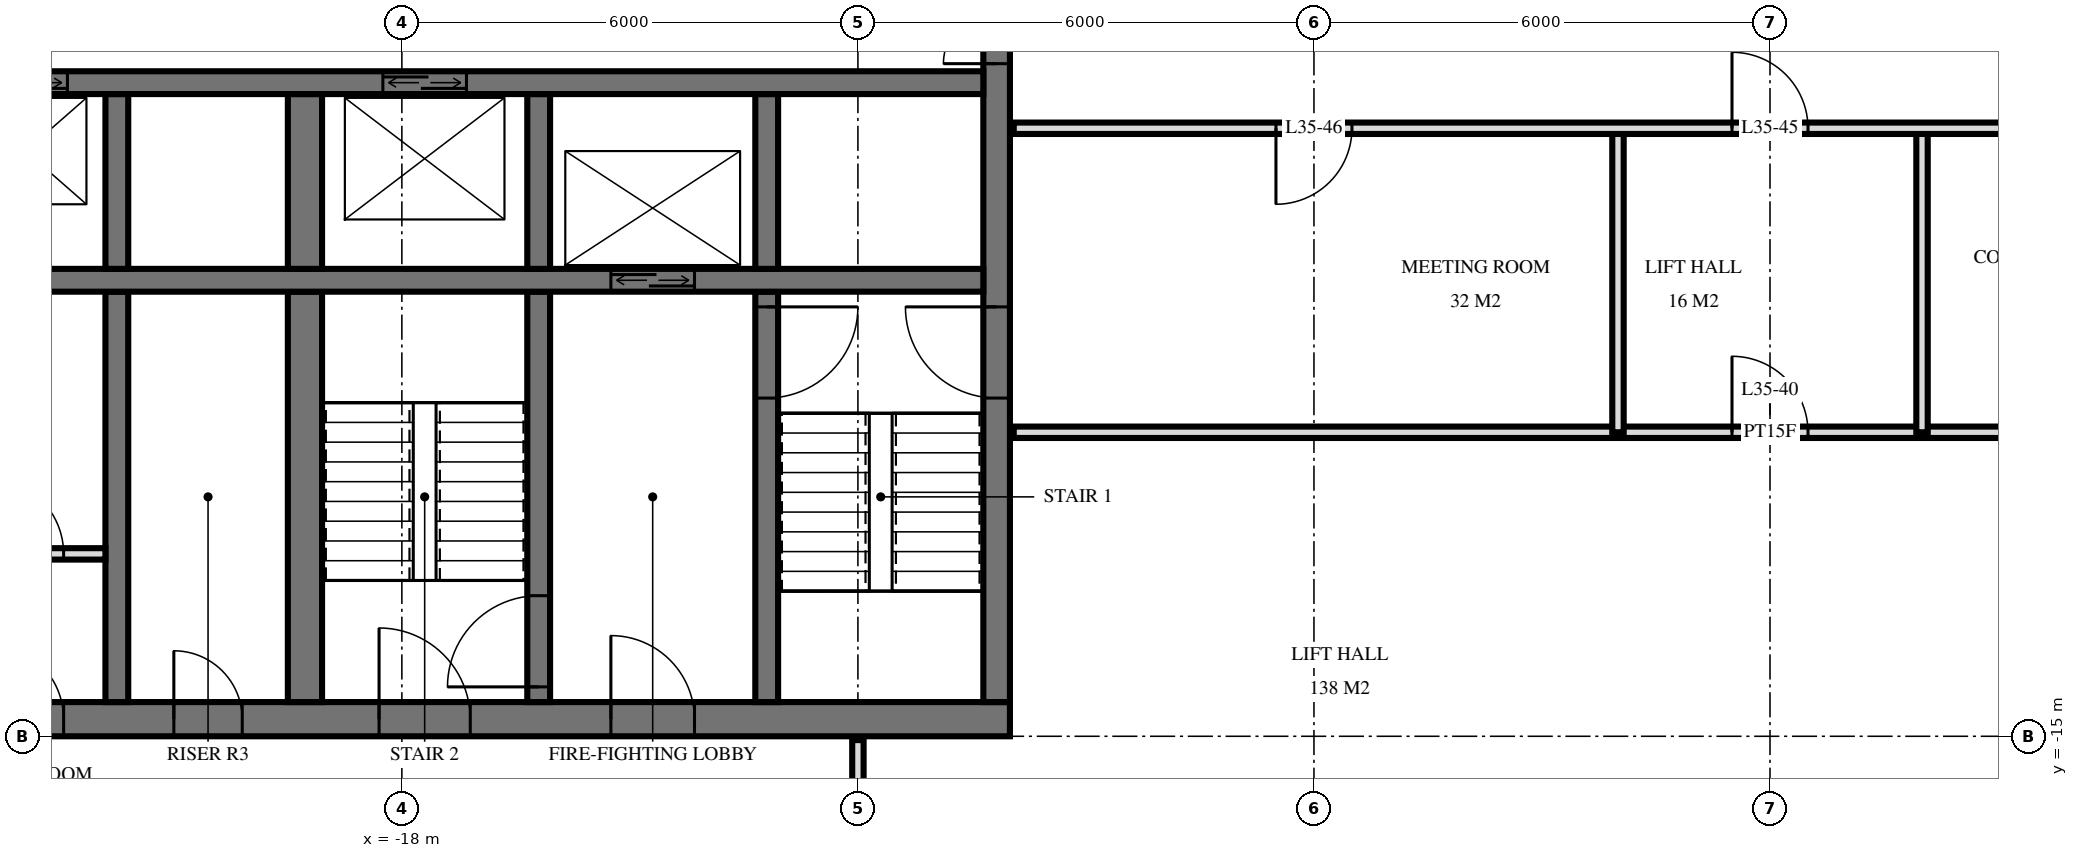
"""IFC4 building model, lengths in metres.
Left out: names, types, materials, properties, quantities, classifications, styles, units other than length and angle.
Written with IfcOpenShell. Run it as: python <this file> out.ifc"""

import sys

from ifc_helpers import new_model, si_unit, direction, frame, frame_2d, origin, place, context, subcontext, project, spatial, rectangle, extrude, element, fill, save


model = new_model("IFC4")
c1 = context("Model", 3, precision=1e-05, world=origin(), true_north=direction((0.0, 1.0)))
c2 = subcontext(c1, "Body", "Model", "MODEL_VIEW")
j1 = project(units=[si_unit("LENGTHUNIT", "METRE"), si_unit("PLANEANGLEUNIT", "RADIAN")], contexts=[c1])
p1 = place(None, origin())
s1 = spatial("IfcSite", under=j1, at=p1, CompositionType="ELEMENT")
p2 = place(p1, origin())
s2 = spatial("IfcBuilding", under=s1, at=p2, CompositionType="ELEMENT")
p3 = place(p2, frame((0.0, 0.0, 138.0)))
s3 = spatial("IfcBuildingStorey", under=s2, at=p3, CompositionType="ELEMENT", Elevation=138.0)
p4 = place(p3, frame((-24.5, -14.775, 0.0), z_axis=(0.0, 0.0, 1.0), x_axis=(1.0, 0.0, 0.0)))
e1 = element("IfcWall", 1, at=p4, inside=s3, PredefinedType="SHEAR", context=c2, shape_type="SweptSolid", body=[
    extrude(rectangle(XDim=14.5, YDim=0.45, at=frame_2d((7.25, 0.0))), origin(), (0.0, 0.0, 1.0), 3.6),
])
p5 = place(p4, frame((6.2, 0.0, 0.0)))
e2 = element("IfcOpeningElement", 2, at=p5, cuts=e1, PredefinedType="OPENING", context=c2, shape_type="SweptSolid", body=[
    extrude(rectangle(XDim=1.2, YDim=2.1, at=frame_2d((0.6, 1.05))), frame((0.0, 0.235, 0.0), z_axis=(0.0, -1.0, 0.0), x_axis=(1.0, 0.0, 0.0)), (0.0, 0.0, 1.0), 0.47),
])
p6 = place(p4, frame((9.25, 0.0, 0.0)))
e3 = element("IfcOpeningElement", 3, at=p6, cuts=e1, PredefinedType="OPENING", context=c2, shape_type="SweptSolid", body=[
    extrude(rectangle(XDim=1.1, YDim=2.1, at=frame_2d((0.55, 1.05))), frame((0.0, 0.235, 0.0), z_axis=(0.0, -1.0, 0.0), x_axis=(1.0, 0.0, 0.0)), (0.0, 0.0, 1.0), 0.47),
])
p7 = place(p4, frame((3.5, 0.0, 0.0)))
e4 = element("IfcOpeningElement", 4, at=p7, cuts=e1, PredefinedType="OPENING", context=c2, shape_type="SweptSolid", body=[
    extrude(rectangle(XDim=0.9, YDim=2.1, at=frame_2d((0.45, 1.05))), frame((0.0, 0.235, 0.0), z_axis=(0.0, -1.0, 0.0), x_axis=(1.0, 0.0, 0.0)), (0.0, 0.0, 1.0), 0.47),
])
p8 = place(p4, frame((1.05, 0.0, 0.0)))
e5 = element("IfcOpeningElement", 5, at=p8, cuts=e1, PredefinedType="OPENING", context=c2, shape_type="SweptSolid", body=[
    extrude(rectangle(XDim=1.0, YDim=2.1, at=frame_2d((0.5, 1.05))), frame((0.0, 0.235, 0.0), z_axis=(0.0, -1.0, 0.0), x_axis=(1.0, 0.0, 0.0)), (0.0, 0.0, 1.0), 0.47),
])
p9 = place(p3, frame((-10.175, -14.55, 0.0), z_axis=(0.0, 0.0, 1.0), x_axis=(0.0, 1.0, 0.0)))
e6 = element("IfcWall", 6, at=p9, inside=s3, PredefinedType="SHEAR", context=c2, shape_type="SweptSolid", body=[
    extrude(rectangle(XDim=14.1, YDim=0.35, at=frame_2d((7.05, 0.0))), origin(), (0.0, 0.0, 1.0), 3.6),
])
p10 = place(p9, frame((8.4, 0.0, 0.0)))
e7 = element("IfcOpeningElement", 7, at=p10, cuts=e6, PredefinedType="OPENING", context=c2, shape_type="SweptSolid", body=[
    extrude(rectangle(XDim=1.4, YDim=2.4, at=frame_2d((0.7, 1.2))), frame((0.0, 0.185, 0.0), z_axis=(0.0, -1.0, 0.0), x_axis=(1.0, 0.0, 0.0)), (0.0, 0.0, 1.0), 0.37),
])
p11 = place(p9, frame((10.0, 0.0, 0.0)))
e8 = element("IfcOpeningElement", 8, at=p11, cuts=e6, PredefinedType="OPENING", context=c2, shape_type="SweptSolid", body=[
    extrude(rectangle(XDim=1.4, YDim=2.4, at=frame_2d((0.7, 1.2))), frame((0.0, 0.185, 0.0), z_axis=(0.0, -1.0, 0.0), x_axis=(1.0, 0.0, 0.0)), (0.0, 0.0, 1.0), 0.37),
])
p12 = place(p9, frame((4.0, 0.0, 0.0)))
e9 = element("IfcOpeningElement", 9, at=p12, cuts=e6, PredefinedType="OPENING", context=c2, shape_type="SweptSolid", body=[
    extrude(rectangle(XDim=1.2, YDim=2.1, at=frame_2d((0.6, 1.05))), frame((0.0, 0.185, 0.0), z_axis=(0.0, -1.0, 0.0), x_axis=(1.0, 0.0, 0.0)), (0.0, 0.0, 1.0), 0.37),
])
p13 = place(p3, frame((-24.05, -6.4, 0.0), z_axis=(0.0, 0.0, 1.0), x_axis=(1.0, 0.0, 0.0)))
e10 = element("IfcWall", 10, at=p13, inside=s3, PredefinedType="SHEAR", context=c2, shape_type="SweptSolid", body=[
    extrude(rectangle(XDim=13.7, YDim=0.3, at=frame_2d((6.85, 0.0))), origin(), (0.0, 0.0, 1.0), 3.6),
])
p14 = place(p13, frame((0.55, 0.0, 0.0)))
e11 = element("IfcOpeningElement", 11, at=p14, cuts=e10, PredefinedType="OPENING", context=c2, shape_type="SweptSolid", body=[
    extrude(rectangle(XDim=1.1, YDim=2.1, at=frame_2d((0.55, 1.05))), frame((0.0, 0.16, 0.0), z_axis=(0.0, -1.0, 0.0), x_axis=(1.0, 0.0, 0.0)), (0.0, 0.0, 1.0), 0.32),
])
p15 = place(p13, frame((5.8, 0.0, 0.0)))
e12 = element("IfcOpeningElement", 12, at=p15, cuts=e10, PredefinedType="OPENING", context=c2, shape_type="SweptSolid", body=[
    extrude(rectangle(XDim=1.1, YDim=2.1, at=frame_2d((0.55, 1.05))), frame((0.0, 0.16, 0.0), z_axis=(0.0, -1.0, 0.0), x_axis=(1.0, 0.0, 0.0)), (0.0, 0.0, 1.0), 0.32),
])
p16 = place(p3, frame((-24.05, -9.0, 0.0), z_axis=(0.0, 0.0, 1.0), x_axis=(1.0, 0.0, 0.0)))
e13 = element("IfcWall", 13, at=p16, inside=s3, PredefinedType="SHEAR", context=c2, shape_type="SweptSolid", body=[
    extrude(rectangle(XDim=13.7, YDim=0.3, at=frame_2d((6.85, 0.0))), origin(), (0.0, 0.0, 1.0), 3.6),
])
p17 = place(p16, frame((8.8, 0.0, 0.0)))
e14 = element("IfcOpeningElement", 14, at=p17, cuts=e13, PredefinedType="OPENING", context=c2, shape_type="SweptSolid", body=[
    extrude(rectangle(XDim=1.1, YDim=2.1, at=frame_2d((0.55, 1.05))), frame((0.0, 0.16, 0.0), z_axis=(0.0, -1.0, 0.0), x_axis=(1.0, 0.0, 0.0)), (0.0, 0.0, 1.0), 0.32),
])
p18 = place(p3, frame((-13.2, -8.85, 0.0), z_axis=(0.0, 0.0, 1.0), x_axis=(0.0, 1.0, 0.0)))
e15 = element("IfcWall", 15, at=p18, inside=s3, PredefinedType="SHEAR", context=c2, shape_type="SweptSolid", body=[
    extrude(rectangle(XDim=2.3, YDim=0.3, at=frame_2d((1.15, 0.0))), origin(), (0.0, 0.0, 1.0), 3.6),
])
p19 = place(p3, frame((-13.2, -14.55, 0.0), z_axis=(0.0, 0.0, 1.0), x_axis=(0.0, 1.0, 0.0)))
e16 = element("IfcWall", 16, at=p19, inside=s3, PredefinedType="SHEAR", context=c2, shape_type="SweptSolid", body=[
    extrude(rectangle(XDim=5.4, YDim=0.3, at=frame_2d((2.7, 0.0))), origin(), (0.0, 0.0, 1.0), 3.6),
])
p20 = place(p19, frame((4.0, 0.0, 0.0)))
e17 = element("IfcOpeningElement", 17, at=p20, cuts=e16, PredefinedType="OPENING", context=c2, shape_type="SweptSolid", body=[
    extrude(rectangle(XDim=1.2, YDim=2.1, at=frame_2d((0.6, 1.05))), frame((0.0, 0.16, 0.0), z_axis=(0.0, -1.0, 0.0), x_axis=(1.0, 0.0, 0.0)), (0.0, 0.0, 1.0), 0.32),
])
p21 = place(p3, frame((-16.2, -8.85, 0.0), z_axis=(0.0, 0.0, 1.0), x_axis=(0.0, 1.0, 0.0)))
e18 = element("IfcWall", 18, at=p21, inside=s3, PredefinedType="SHEAR", context=c2, shape_type="SweptSolid", body=[
    extrude(rectangle(XDim=2.3, YDim=0.3, at=frame_2d((1.15, 0.0))), origin(), (0.0, 0.0, 1.0), 3.6),
])
p22 = place(p3, frame((-16.2, -14.55, 0.0), z_axis=(0.0, 0.0, 1.0), x_axis=(0.0, 1.0, 0.0)))
e19 = element("IfcWall", 19, at=p22, inside=s3, PredefinedType="SHEAR", context=c2, shape_type="SweptSolid", body=[
    extrude(rectangle(XDim=5.4, YDim=0.3, at=frame_2d((2.7, 0.0))), origin(), (0.0, 0.0, 1.0), 3.6),
])
p23 = place(p22, frame((0.2, 0.0, 0.0)))
e20 = element("IfcOpeningElement", 20, at=p23, cuts=e19, PredefinedType="OPENING", context=c2, shape_type="SweptSolid", body=[
    extrude(rectangle(XDim=1.2, YDim=2.1, at=frame_2d((0.6, 1.05))), frame((0.0, 0.16, 0.0), z_axis=(0.0, -1.0, 0.0), x_axis=(1.0, 0.0, 0.0)), (0.0, 0.0, 1.0), 0.32),
])
p24 = place(p3, frame((-19.275, -8.85, 0.0), z_axis=(0.0, 0.0, 1.0), x_axis=(0.0, 1.0, 0.0)))
e21 = element("IfcWall", 21, at=p24, inside=s3, PredefinedType="SHEAR", context=c2, shape_type="SweptSolid", body=[
    extrude(rectangle(XDim=2.3, YDim=0.45, at=frame_2d((1.15, 0.0))), origin(), (0.0, 0.0, 1.0), 3.6),
])
p25 = place(p3, frame((-19.275, -14.55, 0.0), z_axis=(0.0, 0.0, 1.0), x_axis=(0.0, 1.0, 0.0)))
e22 = element("IfcWall", 22, at=p25, inside=s3, PredefinedType="SHEAR", context=c2, shape_type="SweptSolid", body=[
    extrude(rectangle(XDim=5.4, YDim=0.45, at=frame_2d((2.7, 0.0))), origin(), (0.0, 0.0, 1.0), 3.6),
])
p26 = place(p3, frame((-21.75, -8.85, 0.0), z_axis=(0.0, 0.0, 1.0), x_axis=(0.0, 1.0, 0.0)))
e23 = element("IfcWall", 23, at=p26, inside=s3, PredefinedType="SHEAR", context=c2, shape_type="SweptSolid", body=[
    extrude(rectangle(XDim=2.3, YDim=0.3, at=frame_2d((1.15, 0.0))), origin(), (0.0, 0.0, 1.0), 3.6),
])
p27 = place(p3, frame((-21.75, -14.55, 0.0), z_axis=(0.0, 0.0, 1.0), x_axis=(0.0, 1.0, 0.0)))
e24 = element("IfcWall", 24, at=p27, inside=s3, PredefinedType="SHEAR", context=c2, shape_type="SweptSolid", body=[
    extrude(rectangle(XDim=5.4, YDim=0.3, at=frame_2d((2.7, 0.0))), origin(), (0.0, 0.0, 1.0), 3.6),
])
p28 = place(p3, frame((-24.0, -12.6, 0.0), z_axis=(0.0, 0.0, 1.0), x_axis=(1.0, 0.0, 0.0)))
e25 = element("IfcWall", 25, at=p28, inside=s3, PredefinedType="PARTITIONING", context=c2, shape_type="SweptSolid", body=[
    extrude(rectangle(XDim=2.1, YDim=0.15, at=frame_2d((1.05, 0.0))), origin(), (0.0, 0.0, 1.0), 3.3),
])
p29 = place(p28, frame((0.55, 0.0, 0.0)))
e26 = element("IfcOpeningElement", 26, at=p29, cuts=e25, PredefinedType="OPENING", context=c2, shape_type="SweptSolid", body=[
    extrude(rectangle(XDim=1.0, YDim=2.1, at=frame_2d((0.5, 1.05))), frame((0.0, 0.085, 0.0), z_axis=(0.0, -1.0, 0.0), x_axis=(1.0, 0.0, 0.0)), (0.0, 0.0, 1.0), 0.17),
])
for number, where, z_axis, x_axis in (
    (27, (2.0, -11.0, 0.0), (0.0, 0.0, 1.0), (0.0, 1.0, 0.0)),
    (28, (-2.0, -11.0, 0.0), (0.0, 0.0, 1.0), (0.0, 1.0, 0.0)),
):
    element("IfcWall", number, at=place(p3, frame(where, z_axis=z_axis, x_axis=x_axis)), inside=s3, PredefinedType="PARTITIONING", context=c2, shape_type="SweptSolid", body=[
        extrude(rectangle(XDim=4.0, YDim=0.15, at=frame_2d((2.0, 0.0))), origin(), (0.0, 0.0, 1.0), 3.32),
    ])
p30 = place(p3, frame((-12.0, -17.4, 0.0), z_axis=(0.0, 0.0, 1.0), x_axis=(0.0, 1.0, 0.0)))
e29 = element("IfcWall", 29, at=p30, inside=s3, PredefinedType="PARTITIONING", context=c2, shape_type="SweptSolid", body=[
    extrude(rectangle(XDim=2.35, YDim=0.15, at=frame_2d((1.175, 0.0))), origin(), (0.0, 0.0, 1.0), 3.32),
])
p31 = place(p30, frame((0.7, 0.0, 0.0)))
e30 = element("IfcOpeningElement", 30, at=p31, cuts=e29, PredefinedType="OPENING", context=c2, shape_type="SweptSolid", body=[
    extrude(rectangle(XDim=1.0, YDim=2.1, at=frame_2d((0.5, 1.05))), frame((0.0, 0.085, 0.0), z_axis=(0.0, -1.0, 0.0), x_axis=(1.0, 0.0, 0.0)), (0.0, 0.0, 1.0), 0.17),
])
p32 = place(p3, frame((-9.95, -11.0, 0.0), z_axis=(0.0, 0.0, 1.0), x_axis=(1.0, 0.0, 0.0)))
e31 = element("IfcWall", 31, at=p32, inside=s3, PredefinedType="PARTITIONING", context=c2, shape_type="SweptSolid", body=[
    extrude(rectangle(XDim=19.9, YDim=0.15, at=frame_2d((9.95, 0.0))), origin(), (0.0, 0.0, 1.0), 3.32),
])
p33 = place(p32, frame((9.45, 0.0, 0.0)))
e32 = element("IfcOpeningElement", 32, at=p33, cuts=e31, PredefinedType="OPENING", context=c2, shape_type="SweptSolid", body=[
    extrude(rectangle(XDim=1.0, YDim=2.1, at=frame_2d((0.5, 1.05))), frame((0.0, 0.085, 0.0), z_axis=(0.0, -1.0, 0.0), x_axis=(1.0, 0.0, 0.0)), (0.0, 0.0, 1.0), 0.17),
])
p34 = place(p32, frame((15.45, 0.0, 0.0)))
e33 = element("IfcOpeningElement", 33, at=p34, cuts=e31, PredefinedType="OPENING", context=c2, shape_type="SweptSolid", body=[
    extrude(rectangle(XDim=1.0, YDim=2.1, at=frame_2d((0.5, 1.05))), frame((0.0, 0.085, 0.0), z_axis=(0.0, -1.0, 0.0), x_axis=(1.0, 0.0, 0.0)), (0.0, 0.0, 1.0), 0.17),
])
p35 = place(p3, frame((-9.95, -7.0, 0.0), z_axis=(0.0, 0.0, 1.0), x_axis=(1.0, 0.0, 0.0)))
e34 = element("IfcWall", 34, at=p35, inside=s3, PredefinedType="PARTITIONING", context=c2, shape_type="SweptSolid", body=[
    extrude(rectangle(XDim=19.9, YDim=0.15, at=frame_2d((9.95, 0.0))), origin(), (0.0, 0.0, 1.0), 3.32),
])
p36 = place(p35, frame((9.45, 0.0, 0.0)))
e35 = element("IfcOpeningElement", 35, at=p36, cuts=e34, PredefinedType="OPENING", context=c2, shape_type="SweptSolid", body=[
    extrude(rectangle(XDim=1.0, YDim=2.1, at=frame_2d((0.5, 1.05))), frame((0.0, 0.085, 0.0), z_axis=(0.0, -1.0, 0.0), x_axis=(1.0, 0.0, 0.0)), (0.0, 0.0, 1.0), 0.17),
])
p37 = place(p35, frame((3.45, 0.0, 0.0)))
e36 = element("IfcOpeningElement", 36, at=p37, cuts=e34, PredefinedType="OPENING", context=c2, shape_type="SweptSolid", body=[
    extrude(rectangle(XDim=1.0, YDim=2.1, at=frame_2d((0.5, 1.05))), frame((0.0, 0.085, 0.0), z_axis=(0.0, -1.0, 0.0), x_axis=(1.0, 0.0, 0.0)), (0.0, 0.0, 1.0), 0.17),
])
p38 = place(p14, origin())
e37 = element("IfcDoor", 37, at=p38, inside=s3, OperationType="DOUBLE_DOOR_SLIDING", PredefinedType="USERDEFINED", context=c2, shape_type="SweptSolid", body=[
    extrude(rectangle(XDim=1.1, YDim=2.1, at=frame_2d((0.55, 1.05))), frame((0.0, 0.025, 0.0), z_axis=(0.0, -1.0, 0.0), x_axis=(1.0, 0.0, 0.0)), (0.0, 0.0, 1.0), 0.05),
])
fill(e11, e37)
p39 = place(p17, origin())
e38 = element("IfcDoor", 38, at=p39, inside=s3, OperationType="DOUBLE_DOOR_SLIDING", PredefinedType="USERDEFINED", context=c2, shape_type="SweptSolid", body=[
    extrude(rectangle(XDim=1.1, YDim=2.1, at=frame_2d((0.55, 1.05))), frame((0.0, 0.025, 0.0), z_axis=(0.0, -1.0, 0.0), x_axis=(1.0, 0.0, 0.0)), (0.0, 0.0, 1.0), 0.05),
])
fill(e14, e38)
p40 = place(p15, origin())
e39 = element("IfcDoor", 39, at=p40, inside=s3, OperationType="DOUBLE_DOOR_SLIDING", PredefinedType="USERDEFINED", context=c2, shape_type="SweptSolid", body=[
    extrude(rectangle(XDim=1.1, YDim=2.1, at=frame_2d((0.55, 1.05))), frame((0.0, 0.025, 0.0), z_axis=(0.0, -1.0, 0.0), x_axis=(1.0, 0.0, 0.0)), (0.0, 0.0, 1.0), 0.05),
])
fill(e12, e39)
p41 = place(p10, origin())
e40 = element("IfcDoor", 40, at=p41, inside=s3, OperationType="DOUBLE_DOOR_SINGLE_SWING", PredefinedType="DOOR", context=c2, shape_type="SweptSolid", body=[
    extrude(rectangle(XDim=1.4, YDim=2.4, at=frame_2d((0.7, 1.2))), frame((0.0, 0.025, 0.0), z_axis=(0.0, -1.0, 0.0), x_axis=(1.0, 0.0, 0.0)), (0.0, 0.0, 1.0), 0.05),
])
fill(e7, e40)
p42 = place(p12, origin())
e41 = element("IfcDoor", 41, at=p42, inside=s3, OperationType="SINGLE_SWING_LEFT", PredefinedType="DOOR", context=c2, shape_type="SweptSolid", body=[
    extrude(rectangle(XDim=1.2, YDim=2.1, at=frame_2d((0.6, 1.05))), frame((0.0, 0.025, 0.0), z_axis=(0.0, -1.0, 0.0), x_axis=(1.0, 0.0, 0.0)), (0.0, 0.0, 1.0), 0.05),
])
fill(e9, e41)
p43 = place(p5, origin())
e42 = element("IfcDoor", 42, at=p43, inside=s3, OperationType="SINGLE_SWING_RIGHT", PredefinedType="DOOR", context=c2, shape_type="SweptSolid", body=[
    extrude(rectangle(XDim=1.2, YDim=2.1, at=frame_2d((0.6, 1.05))), frame((0.0, 0.025, 0.0), z_axis=(0.0, -1.0, 0.0), x_axis=(1.0, 0.0, 0.0)), (0.0, 0.0, 1.0), 0.05),
])
fill(e2, e42)
p44 = place(p6, origin())
e43 = element("IfcDoor", 43, at=p44, inside=s3, OperationType="SINGLE_SWING_RIGHT", PredefinedType="DOOR", context=c2, shape_type="SweptSolid", body=[
    extrude(rectangle(XDim=1.1, YDim=2.1, at=frame_2d((0.55, 1.05))), frame((0.0, 0.025, 0.0), z_axis=(0.0, -1.0, 0.0), x_axis=(1.0, 0.0, 0.0)), (0.0, 0.0, 1.0), 0.05),
])
fill(e3, e43)
p45 = place(p7, origin())
e44 = element("IfcDoor", 44, at=p45, inside=s3, OperationType="SINGLE_SWING_RIGHT", PredefinedType="DOOR", context=c2, shape_type="SweptSolid", body=[
    extrude(rectangle(XDim=0.9, YDim=2.1, at=frame_2d((0.45, 1.05))), frame((0.0, 0.025, 0.0), z_axis=(0.0, -1.0, 0.0), x_axis=(1.0, 0.0, 0.0)), (0.0, 0.0, 1.0), 0.05),
])
fill(e4, e44)
p46 = place(p8, origin())
e45 = element("IfcDoor", 45, at=p46, inside=s3, OperationType="SINGLE_SWING_RIGHT", PredefinedType="DOOR", context=c2, shape_type="SweptSolid", body=[
    extrude(rectangle(XDim=1.0, YDim=2.1, at=frame_2d((0.5, 1.05))), frame((0.0, 0.025, 0.0), z_axis=(0.0, -1.0, 0.0), x_axis=(1.0, 0.0, 0.0)), (0.0, 0.0, 1.0), 0.05),
])
fill(e5, e45)
p47 = place(p20, frame((0.6, 0.0, 0.0), z_axis=(0.0, 0.0, 1.0), x_axis=(-1.0, 0.0, 0.0)))
e46 = element("IfcDoor", 46, at=p47, inside=s3, OperationType="SINGLE_SWING_RIGHT", PredefinedType="DOOR", context=c2, shape_type="SweptSolid", body=[
    extrude(rectangle(XDim=1.2, YDim=2.1, at=frame_2d((0.0, 1.05))), frame((0.0, -0.025, 0.0), z_axis=(0.0, 1.0, 0.0), x_axis=(-1.0, 0.0, 0.0)), (0.0, 0.0, 1.0), 0.05),
])
fill(e17, e46)
p48 = place(p23, origin())
e47 = element("IfcDoor", 47, at=p48, inside=s3, OperationType="SINGLE_SWING_RIGHT", PredefinedType="DOOR", context=c2, shape_type="SweptSolid", body=[
    extrude(rectangle(XDim=1.2, YDim=2.1, at=frame_2d((0.6, 1.05))), frame((0.0, 0.025, 0.0), z_axis=(0.0, -1.0, 0.0), x_axis=(1.0, 0.0, 0.0)), (0.0, 0.0, 1.0), 0.05),
])
fill(e20, e47)
p49 = place(p29, origin())
e48 = element("IfcDoor", 48, at=p49, inside=s3, OperationType="SINGLE_SWING_RIGHT", PredefinedType="DOOR", context=c2, shape_type="SweptSolid", body=[
    extrude(rectangle(XDim=1.0, YDim=2.1, at=frame_2d((0.5, 1.05))), frame((0.0, 0.025, 0.0), z_axis=(0.0, -1.0, 0.0), x_axis=(1.0, 0.0, 0.0)), (0.0, 0.0, 1.0), 0.05),
])
fill(e26, e48)
p50 = place(p33, origin())
e49 = element("IfcDoor", 49, at=p50, inside=s3, OperationType="SINGLE_SWING_RIGHT", PredefinedType="DOOR", context=c2, shape_type="SweptSolid", body=[
    extrude(rectangle(XDim=1.0, YDim=2.1, at=frame_2d((0.5, 1.05))), frame((0.0, 0.025, 0.0), z_axis=(0.0, -1.0, 0.0), x_axis=(1.0, 0.0, 0.0)), (0.0, 0.0, 1.0), 0.05),
])
fill(e32, e49)
p51 = place(p36, origin())
e50 = element("IfcDoor", 50, at=p51, inside=s3, OperationType="SINGLE_SWING_RIGHT", PredefinedType="DOOR", context=c2, shape_type="SweptSolid", body=[
    extrude(rectangle(XDim=1.0, YDim=2.1, at=frame_2d((0.5, 1.05))), frame((0.0, 0.025, 0.0), z_axis=(0.0, -1.0, 0.0), x_axis=(1.0, 0.0, 0.0)), (0.0, 0.0, 1.0), 0.05),
])
fill(e35, e50)
p52 = place(p37, frame((0.5, 0.0, 0.0), z_axis=(0.0, 0.0, 1.0), x_axis=(-1.0, 0.0, 0.0)))
e51 = element("IfcDoor", 51, at=p52, inside=s3, OperationType="SINGLE_SWING_LEFT", PredefinedType="DOOR", context=c2, shape_type="SweptSolid", body=[
    extrude(rectangle(XDim=1.0, YDim=2.1, at=frame_2d((0.0, 1.05))), frame((0.0, -0.025, 0.0), z_axis=(0.0, 1.0, 0.0), x_axis=(-1.0, 0.0, 0.0)), (0.0, 0.0, 1.0), 0.05),
])
fill(e36, e51)
save(model, sys.argv[1])
